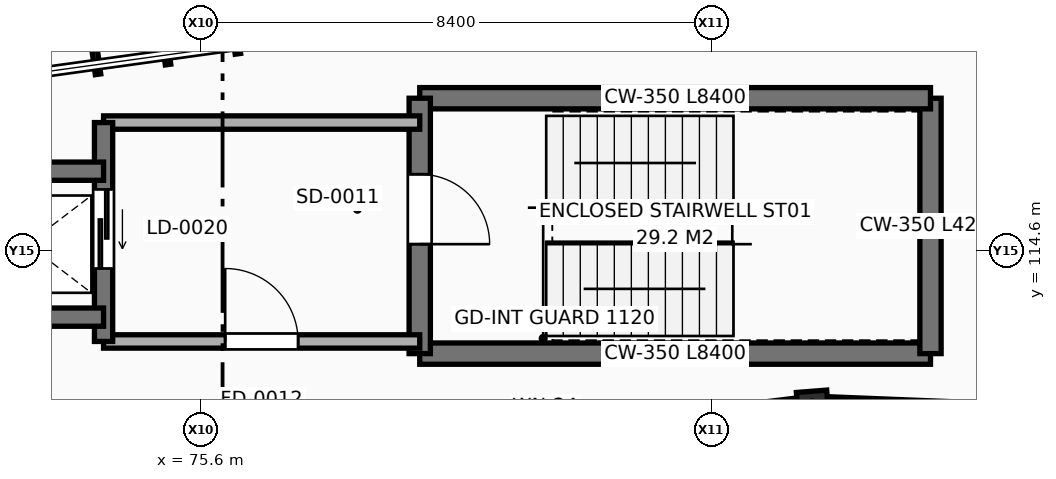
"""IFC4 building model, lengths in metres.
Left out: names, types, materials, properties, quantities, classifications, styles, units other than length and angle.
Written with IfcOpenShell. Run it as: python <this file> out.ifc"""

import sys

from ifc_helpers import new_model, si_unit, direction, frame, frame_2d, origin, origin_2d, place, context, subcontext, project, spatial, rectangle, extrude, element, fill, save


model = new_model("IFC4")
c1 = context("Model", 3, precision=1e-05, world=origin(), true_north=direction((0.0, 1.0)))
c2 = subcontext(c1, "Body", "Model", "MODEL_VIEW")
j1 = project(units=[si_unit("LENGTHUNIT", "METRE"), si_unit("PLANEANGLEUNIT", "RADIAN")], contexts=[c1])
p1 = place(None, origin())
s1 = spatial("IfcSite", under=j1, at=p1, CompositionType="ELEMENT")
p2 = place(p1, origin())
s2 = spatial("IfcBuilding", under=s1, at=p2, CompositionType="ELEMENT")
p3 = place(p2, frame((0.0, 0.0, 22.2)))
s3 = spatial("IfcBuildingStorey", under=s2, at=p3, CompositionType="ELEMENT", Elevation=22.2)
p4 = place(p3, frame((85.664, 112.031, 0.0), z_axis=(0.0, 0.0, 1.0), x_axis=(-0.078459095728, 0.996917333733, 0.0)))
e1 = element("IfcColumn", 1, at=p4, inside=s3, PredefinedType="COLUMN", context=c2, shape_type="SweptSolid", body=[
    extrude(rectangle(XDim=0.5, YDim=0.5, at=origin_2d()), origin(), (0.0, 0.0, 1.0), 4.2),
])
p5 = place(p3, frame((99.029, 111.496, 0.0), z_axis=(0.0, 0.0, 1.0), x_axis=(-0.999198007922, 0.040041740285, 0.0)))
e2 = element("IfcWall", 2, at=p5, inside=s3, PredefinedType="SOLIDWALL", context=c2, shape_type="SweptSolid", body=[
    extrude(rectangle(XDim=13.097, YDim=0.34, at=frame_2d((6.548, 0.0))), origin(), (0.0, 0.0, 1.0), 3.387),
])
p6 = place(p5, frame((3.766, 0.0, 0.9)))
e3 = element("IfcOpeningElement", 3, at=p6, cuts=e2, PredefinedType="OPENING", context=c2, shape_type="SweptSolid", body=[
    extrude(rectangle(XDim=0.9, YDim=2.2, at=frame_2d((0.45, 1.1))), frame((0.0, 0.18, 0.0), z_axis=(0.0, -1.0, 0.0), x_axis=(1.0, 0.0, 0.0)), (0.0, 0.0, 1.0), 0.36),
])
p7 = place(p5, frame((8.431, 0.0, 0.9)))
e4 = element("IfcOpeningElement", 4, at=p7, cuts=e2, PredefinedType="OPENING", context=c2, shape_type="SweptSolid", body=[
    extrude(rectangle(XDim=0.9, YDim=2.2, at=frame_2d((0.45, 1.1))), frame((0.0, 0.18, 0.0), z_axis=(0.0, -1.0, 0.0), x_axis=(1.0, 0.0, 0.0)), (0.0, 0.0, 1.0), 0.36),
])
p8 = place(p3, frame((85.403, 112.0, 0.0), z_axis=(0.0, 0.0, 1.0), x_axis=(-0.992612043569, -0.121331492044, 0.0)))
e5 = element("IfcWall", 5, at=p8, inside=s3, PredefinedType="SOLIDWALL", context=c2, shape_type="SweptSolid", body=[
    extrude(rectangle(XDim=12.852, YDim=0.34, at=frame_2d((6.426, 0.0))), origin(), (0.0, 0.0, 1.0), 3.387),
])
p9 = place(p8, frame((3.584, 0.0, 0.9)))
e6 = element("IfcOpeningElement", 6, at=p9, cuts=e5, PredefinedType="OPENING", context=c2, shape_type="SweptSolid", body=[
    extrude(rectangle(XDim=1.05, YDim=2.2, at=frame_2d((0.525, 1.1))), frame((0.0, 0.18, 0.0), z_axis=(0.0, -1.0, 0.0), x_axis=(1.0, 0.0, 0.0)), (0.0, 0.0, 1.0), 0.36),
])
p10 = place(p8, frame((8.218, 0.0, 0.9)))
e7 = element("IfcOpeningElement", 7, at=p10, cuts=e5, PredefinedType="OPENING", context=c2, shape_type="SweptSolid", body=[
    extrude(rectangle(XDim=1.05, YDim=2.2, at=frame_2d((0.525, 1.1))), frame((0.0, 0.18, 0.0), z_axis=(0.0, -1.0, 0.0), x_axis=(1.0, 0.0, 0.0)), (0.0, 0.0, 1.0), 0.36),
])
p11 = place(p3, frame((79.2, 112.9, 0.0), z_axis=(0.0, 0.0, 1.0), x_axis=(1.0, 0.0, 0.0)))
e8 = element("IfcWall", 8, at=p11, inside=s3, PredefinedType="SHEAR", context=c2, shape_type="SweptSolid", body=[
    extrude(rectangle(XDim=8.4, YDim=0.35, at=frame_2d((4.2, 0.0))), origin(), (0.0, 0.0, 1.0), 3.92),
])
p12 = place(p3, frame((87.6, 112.9, 0.0), z_axis=(0.0, 0.0, 1.0), x_axis=(0.0, 1.0, 0.0)))
e9 = element("IfcWall", 9, at=p12, inside=s3, PredefinedType="SHEAR", context=c2, shape_type="SweptSolid", body=[
    extrude(rectangle(XDim=4.2, YDim=0.35, at=frame_2d((2.1, 0.0))), origin(), (0.0, 0.0, 1.0), 3.92),
])
p13 = place(p3, frame((87.6, 117.1, 0.0), z_axis=(0.0, 0.0, 1.0), x_axis=(-1.0, 0.0, 0.0)))
e10 = element("IfcWall", 10, at=p13, inside=s3, PredefinedType="SHEAR", context=c2, shape_type="SweptSolid", body=[
    extrude(rectangle(XDim=8.4, YDim=0.35, at=frame_2d((4.2, 0.0))), origin(), (0.0, 0.0, 1.0), 3.92),
])
p14 = place(p3, frame((79.2, 117.1, 0.0), z_axis=(0.0, 0.0, 1.0), x_axis=(0.0, -1.0, 0.0)))
e11 = element("IfcWall", 11, at=p14, inside=s3, PredefinedType="SHEAR", context=c2, shape_type="SweptSolid", body=[
    extrude(rectangle(XDim=4.2, YDim=0.35, at=frame_2d((2.1, 0.0))), origin(), (0.0, 0.0, 1.0), 3.92),
])
p15 = place(p14, frame((1.25, 0.0, 0.0)))
e12 = element("IfcOpeningElement", 12, at=p15, cuts=e11, PredefinedType="OPENING", context=c2, shape_type="SweptSolid", body=[
    extrude(rectangle(XDim=1.15, YDim=2.2, at=frame_2d((0.575, 1.1))), frame((0.0, 0.185, 0.0), z_axis=(0.0, -1.0, 0.0), x_axis=(1.0, 0.0, 0.0)), (0.0, 0.0, 1.0), 0.37),
])
p16 = place(p3, frame((74.0, 113.1, 0.0), z_axis=(0.0, 0.0, 1.0), x_axis=(1.0, 0.0, 0.0)))
e13 = element("IfcWall", 13, at=p16, inside=s3, PredefinedType="SOLIDWALL", context=c2, shape_type="SweptSolid", body=[
    extrude(rectangle(XDim=5.2, YDim=0.22, at=frame_2d((2.6, 0.0))), origin(), (0.0, 0.0, 1.0), 3.92),
])
p17 = place(p16, frame((2.0, 0.0, 0.0)))
e14 = element("IfcOpeningElement", 14, at=p17, cuts=e13, PredefinedType="OPENING", context=c2, shape_type="SweptSolid", body=[
    extrude(rectangle(XDim=1.2, YDim=2.2, at=frame_2d((0.6, 1.1))), frame((0.0, 0.12, 0.0), z_axis=(0.0, -1.0, 0.0), x_axis=(1.0, 0.0, 0.0)), (0.0, 0.0, 1.0), 0.24),
])
p18 = place(p3, frame((79.2, 116.7, 0.0), z_axis=(0.0, 0.0, 1.0), x_axis=(-1.0, 0.0, 0.0)))
e15 = element("IfcWall", 15, at=p18, inside=s3, PredefinedType="SOLIDWALL", context=c2, shape_type="SweptSolid", body=[
    extrude(rectangle(XDim=5.2, YDim=0.22, at=frame_2d((2.6, 0.0))), origin(), (0.0, 0.0, 1.0), 3.92),
])
p19 = place(p3, frame((74.0, 116.7, 0.0), z_axis=(0.0, 0.0, 1.0), x_axis=(0.0, -1.0, 0.0)))
e16 = element("IfcWall", 16, at=p19, inside=s3, PredefinedType="SHEAR", context=c2, shape_type="SweptSolid", body=[
    extrude(rectangle(XDim=3.6, YDim=0.3, at=frame_2d((1.8, 0.0))), origin(), (0.0, 0.0, 1.0), 3.92),
])
p20 = place(p19, frame((1.1, 0.0, 0.0)))
e17 = element("IfcOpeningElement", 17, at=p20, cuts=e16, PredefinedType="OPENING", context=c2, shape_type="SweptSolid", body=[
    extrude(rectangle(XDim=1.3, YDim=2.3, at=frame_2d((0.65, 1.15))), frame((0.0, 0.16, 0.0), z_axis=(0.0, -1.0, 0.0), x_axis=(1.0, 0.0, 0.0)), (0.0, 0.0, 1.0), 0.32),
])
for number, where, z_axis, x_axis in (
    (18, (74.0, 115.9, 0.0), (0.0, 0.0, 1.0), (-1.0, 0.0, 0.0)),
    (19, (71.5, 113.5, 0.0), (0.0, 0.0, 1.0), (1.0, 0.0, 0.0)),
):
    element("IfcWall", number, at=place(p3, frame(where, z_axis=z_axis, x_axis=x_axis)), inside=s3, PredefinedType="SHEAR", context=c2, shape_type="SweptSolid", body=[
        extrude(rectangle(XDim=2.5, YDim=0.3, at=frame_2d((1.25, 0.0))), origin(), (0.0, 0.0, 1.0), 3.92),
    ])
p21 = place(p15, origin())
e20 = element("IfcDoor", 20, at=p21, inside=s3, OperationType="SINGLE_SWING_RIGHT", PredefinedType="DOOR", context=c2, shape_type="SweptSolid", body=[
    extrude(rectangle(XDim=1.15, YDim=2.2, at=frame_2d((0.575, 1.1))), frame((0.0, 0.025, 0.0), z_axis=(0.0, -1.0, 0.0), x_axis=(1.0, 0.0, 0.0)), (0.0, 0.0, 1.0), 0.05),
])
fill(e12, e20)
p22 = place(p17, origin())
e21 = element("IfcDoor", 21, at=p22, inside=s3, OperationType="SINGLE_SWING_LEFT", PredefinedType="DOOR", context=c2, shape_type="SweptSolid", body=[
    extrude(rectangle(XDim=1.2, YDim=2.2, at=frame_2d((0.6, 1.1))), frame((0.0, 0.025, 0.0), z_axis=(0.0, -1.0, 0.0), x_axis=(1.0, 0.0, 0.0)), (0.0, 0.0, 1.0), 0.05),
])
fill(e14, e21)
p23 = place(p20, origin())
e22 = element("IfcDoor", 22, at=p23, inside=s3, OperationType="SLIDING_TO_LEFT", PredefinedType="DOOR", context=c2, shape_type="SweptSolid", body=[
    extrude(rectangle(XDim=1.3, YDim=2.3, at=frame_2d((0.65, 1.15))), frame((0.0, 0.025, 0.0), z_axis=(0.0, -1.0, 0.0), x_axis=(1.0, 0.0, 0.0)), (0.0, 0.0, 1.0), 0.05),
])
fill(e17, e22)
save(model, sys.argv[1])
